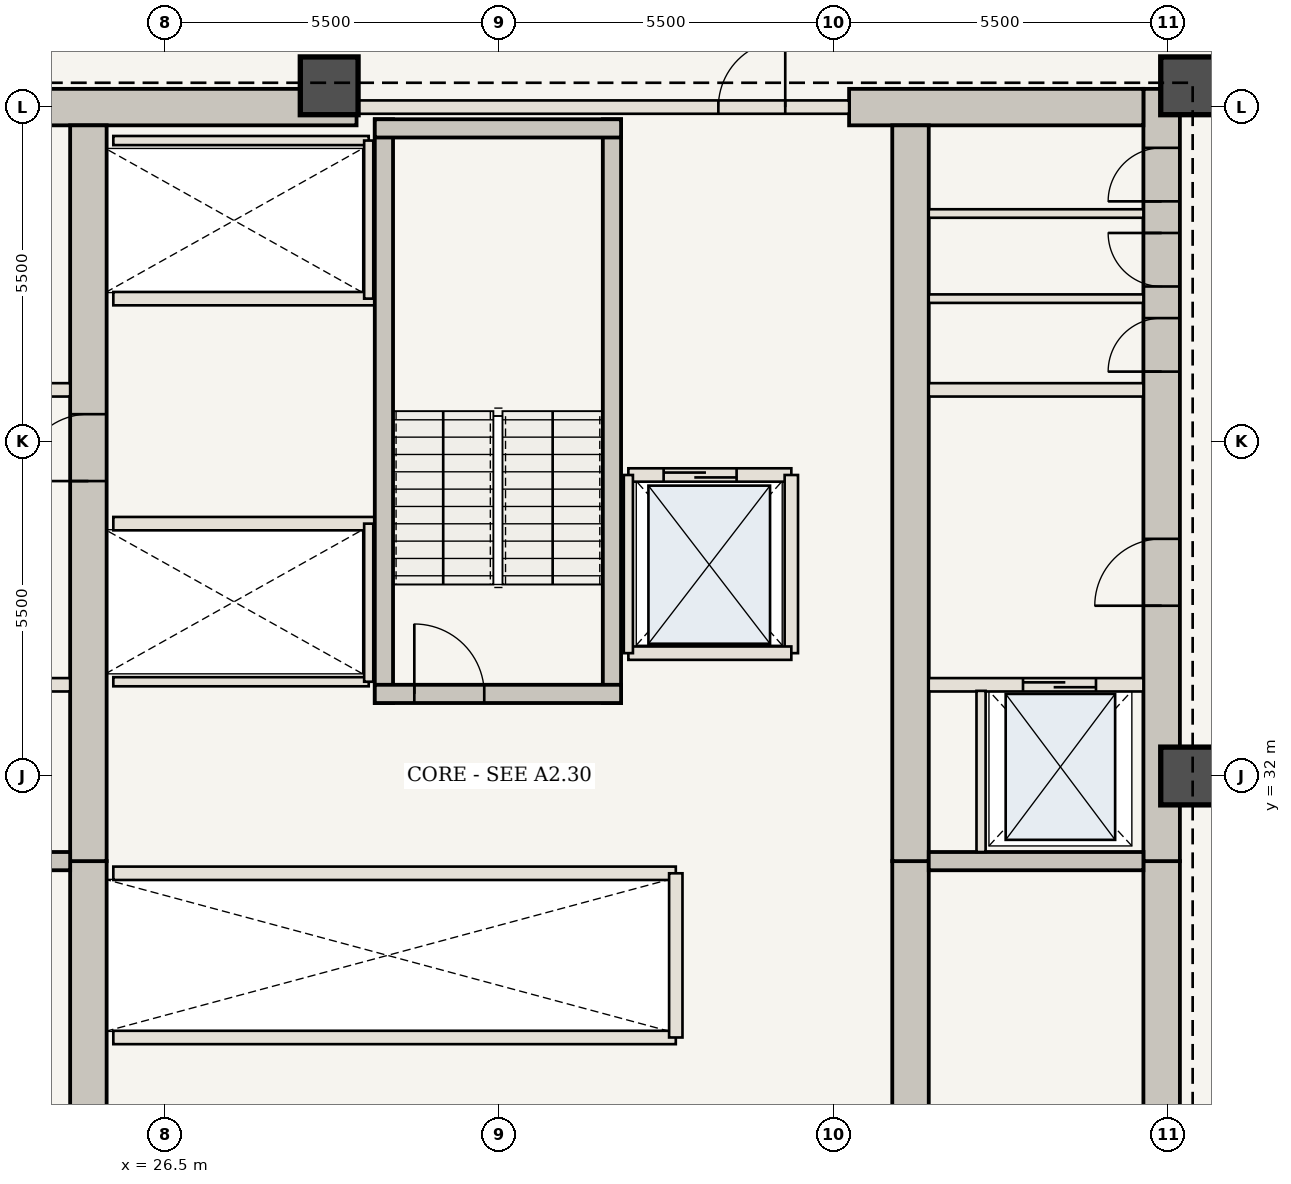
"""IFC4 building model, lengths in metres.
Left out: names, types, materials, properties, quantities, classifications, styles, units other than length and angle.
Written with IfcOpenShell. Run it as: python <this file> out.ifc"""

import sys

from ifc_helpers import new_model, si_unit, direction, frame, frame_2d, origin, origin_2d, place, context, subcontext, project, spatial, rectangle, extrude, element, fill, save


model = new_model("IFC4")
c1 = context("Model", 3, precision=1e-05, world=origin(), true_north=direction((0.0, 1.0)))
c2 = subcontext(c1, "Body", "Model", "MODEL_VIEW")
j1 = project(units=[si_unit("LENGTHUNIT", "METRE"), si_unit("PLANEANGLEUNIT", "RADIAN")], contexts=[c1])
p1 = place(None, origin())
s1 = spatial("IfcSite", under=j1, at=p1, CompositionType="ELEMENT")
p2 = place(p1, origin())
s2 = spatial("IfcBuilding", under=s1, at=p2, CompositionType="ELEMENT")
p3 = place(p2, frame((0.0, 0.0, 129.85)))
s3 = spatial("IfcBuildingStorey", under=s2, at=p3, CompositionType="ELEMENT", Elevation=129.85)
p4 = place(p3, frame((42.89, 20.65, 0.0), z_axis=(0.0, 0.0, 1.0), x_axis=(0.0, 1.0, 0.0)))
e1 = element("IfcWall", 1, at=p4, inside=s3, PredefinedType="SHEAR", context=c2, shape_type="SweptSolid", body=[
    extrude(rectangle(XDim=9.95, YDim=0.6, at=frame_2d((4.975, 0.0))), origin(), (0.0, 0.0, 1.0), 3.85),
])
p5 = place(p4, frame((1.1, 0.0, 0.0)))
e2 = element("IfcOpeningElement", 2, at=p5, cuts=e1, PredefinedType="OPENING", context=c2, shape_type="SweptSolid", body=[
    extrude(rectangle(XDim=1.15, YDim=2.15, at=frame_2d((0.575, 1.075))), frame((0.0, 0.31, 0.0), z_axis=(0.0, -1.0, 0.0), x_axis=(1.0, 0.0, 0.0)), (0.0, 0.0, 1.0), 0.62),
])
p6 = place(p3, frame((42.89, 30.6, 0.0), z_axis=(0.0, 0.0, 1.0), x_axis=(0.0, 1.0, 0.0)))
e3 = element("IfcWall", 3, at=p6, inside=s3, PredefinedType="SHEAR", context=c2, shape_type="SweptSolid", body=[
    extrude(rectangle(XDim=12.7, YDim=0.6, at=frame_2d((6.35, 0.0))), origin(), (0.0, 0.0, 1.0), 3.85),
])
p7 = place(p6, frame((4.2, 0.0, 0.0)))
e4 = element("IfcOpeningElement", 4, at=p7, cuts=e3, PredefinedType="OPENING", context=c2, shape_type="SweptSolid", body=[
    extrude(rectangle(XDim=1.1, YDim=2.15, at=frame_2d((0.55, 1.075))), frame((0.0, 0.31, 0.0), z_axis=(0.0, -1.0, 0.0), x_axis=(1.0, 0.0, 0.0)), (0.0, 0.0, 1.0), 0.62),
])
p8 = place(p6, frame((8.05, 0.0, 0.0)))
e5 = element("IfcOpeningElement", 5, at=p8, cuts=e3, PredefinedType="OPENING", context=c2, shape_type="SweptSolid", body=[
    extrude(rectangle(XDim=0.88, YDim=2.1, at=frame_2d((0.44, 1.05))), frame((0.0, 0.31, 0.0), z_axis=(0.0, -1.0, 0.0), x_axis=(1.0, 0.0, 0.0)), (0.0, 0.0, 1.0), 0.62),
])
p9 = place(p6, frame((9.45, 0.0, 0.0)))
e6 = element("IfcOpeningElement", 6, at=p9, cuts=e3, PredefinedType="OPENING", context=c2, shape_type="SweptSolid", body=[
    extrude(rectangle(XDim=0.88, YDim=2.1, at=frame_2d((0.44, 1.05))), frame((0.0, 0.31, 0.0), z_axis=(0.0, -1.0, 0.0), x_axis=(1.0, 0.0, 0.0)), (0.0, 0.0, 1.0), 0.62),
])
p10 = place(p6, frame((10.85, 0.0, 0.0)))
e7 = element("IfcOpeningElement", 7, at=p10, cuts=e3, PredefinedType="OPENING", context=c2, shape_type="SweptSolid", body=[
    extrude(rectangle(XDim=0.88, YDim=2.1, at=frame_2d((0.44, 1.05))), frame((0.0, 0.31, 0.0), z_axis=(0.0, -1.0, 0.0), x_axis=(1.0, 0.0, 0.0)), (0.0, 0.0, 1.0), 0.62),
])
p11 = place(p3, frame((21.41, 43.0, 0.0), z_axis=(0.0, 0.0, 1.0), x_axis=(1.0, 0.0, 0.0)))
e8 = element("IfcWall", 8, at=p11, inside=s3, PredefinedType="SHEAR", context=c2, shape_type="SweptSolid", body=[
    extrude(rectangle(XDim=8.24, YDim=0.6, at=frame_2d((4.12, 0.0))), origin(), (0.0, 0.0, 1.0), 3.85),
])
p12 = place(p3, frame((37.75, 43.0, 0.0), z_axis=(0.0, 0.0, 1.0), x_axis=(1.0, 0.0, 0.0)))
e9 = element("IfcWall", 9, at=p12, inside=s3, PredefinedType="SHEAR", context=c2, shape_type="SweptSolid", body=[
    extrude(rectangle(XDim=4.84, YDim=0.6, at=frame_2d((2.42, 0.0))), origin(), (0.0, 0.0, 1.0), 3.85),
])
p13 = place(p3, frame((25.24, 21.25, 0.0), z_axis=(0.0, 0.0, 1.0), x_axis=(0.0, 1.0, 0.0)))
e10 = element("IfcWall", 10, at=p13, inside=s3, PredefinedType="SHEAR", context=c2, shape_type="SweptSolid", body=[
    extrude(rectangle(XDim=9.35, YDim=0.6, at=frame_2d((4.675, 0.0))), origin(), (0.0, 0.0, 1.0), 3.85),
])
p14 = place(p3, frame((25.24, 30.6, 0.0), z_axis=(0.0, 0.0, 1.0), x_axis=(0.0, 1.0, 0.0)))
e11 = element("IfcWall", 11, at=p14, inside=s3, PredefinedType="SHEAR", context=c2, shape_type="SweptSolid", body=[
    extrude(rectangle(XDim=12.1, YDim=0.6, at=frame_2d((6.05, 0.0))), origin(), (0.0, 0.0, 1.0), 3.85),
])
p15 = place(p14, frame((6.25, 0.0, 0.0)))
e12 = element("IfcOpeningElement", 12, at=p15, cuts=e11, PredefinedType="OPENING", context=c2, shape_type="SweptSolid", body=[
    extrude(rectangle(XDim=1.1, YDim=2.15, at=frame_2d((0.55, 1.075))), frame((0.0, 0.31, 0.0), z_axis=(0.0, -1.0, 0.0), x_axis=(1.0, 0.0, 0.0)), (0.0, 0.0, 1.0), 0.62),
])
p16 = place(p3, frame((38.76, 21.25, 0.0), z_axis=(0.0, 0.0, 1.0), x_axis=(0.0, 1.0, 0.0)))
e13 = element("IfcWall", 13, at=p16, inside=s3, PredefinedType="SHEAR", context=c2, shape_type="SweptSolid", body=[
    extrude(rectangle(XDim=9.35, YDim=0.6, at=frame_2d((4.675, 0.0))), origin(), (0.0, 0.0, 1.0), 3.85),
])
p17 = place(p3, frame((38.76, 30.6, 0.0), z_axis=(0.0, 0.0, 1.0), x_axis=(0.0, 1.0, 0.0)))
e14 = element("IfcWall", 14, at=p17, inside=s3, PredefinedType="SHEAR", context=c2, shape_type="SweptSolid", body=[
    extrude(rectangle(XDim=12.1, YDim=0.6, at=frame_2d((6.05, 0.0))), origin(), (0.0, 0.0, 1.0), 3.85),
])
for number, where, z_axis, x_axis in (
    (15, (43.35, 32.0, 0.0), (0.0, 0.0, 1.0), (1.0, 0.0, 0.0)),
    (16, (43.35, 43.35, 0.0), (0.0, 0.0, 1.0), (1.0, 0.0, 0.0)),
    (17, (29.2, 43.35, 0.0), (0.0, 0.0, 1.0), (1.0, 0.0, 0.0)),
):
    element("IfcColumn", number, at=place(p3, frame(where, z_axis=z_axis, x_axis=x_axis)), inside=s3, PredefinedType="COLUMN", context=c2, shape_type="SweptSolid", body=[
        extrude(rectangle(XDim=0.95, YDim=0.95, at=origin_2d()), origin(), (0.0, 0.0, 1.0), 3.85),
    ])
for number, where, z_axis, x_axis in (
    (18, (21.41, 30.6, 0.0), (0.0, 0.0, 1.0), (1.0, 0.0, 0.0)),
    (19, (39.06, 30.6, 0.0), (0.0, 0.0, 1.0), (1.0, 0.0, 0.0)),
):
    element("IfcWall", number, at=place(p3, frame(where, z_axis=z_axis, x_axis=x_axis)), inside=s3, PredefinedType="SHEAR", context=c2, shape_type="SweptSolid", body=[
        extrude(rectangle(XDim=3.53, YDim=0.3, at=frame_2d((1.765, 0.0))), origin(), (0.0, 0.0, 1.0), 3.685),
    ])
p18 = place(p3, frame((21.41, 33.5, 0.0), z_axis=(0.0, 0.0, 1.0), x_axis=(1.0, 0.0, 0.0)))
e20 = element("IfcWall", 20, at=p18, inside=s3, PredefinedType="STANDARD", context=c2, shape_type="SweptSolid", body=[
    extrude(rectangle(XDim=3.53, YDim=0.22, at=frame_2d((1.765, 0.0))), origin(), (0.0, 0.0, 1.0), 3.685),
])
p19 = place(p18, frame((0.75, 0.0, 0.0)))
e21 = element("IfcOpeningElement", 21, at=p19, cuts=e20, PredefinedType="OPENING", context=c2, shape_type="SweptSolid", body=[
    extrude(rectangle(XDim=1.2, YDim=2.2, at=frame_2d((0.6, 1.1))), frame((0.0, 0.12, 0.0), z_axis=(0.0, -1.0, 0.0), x_axis=(1.0, 0.0, 0.0)), (0.0, 0.0, 1.0), 0.24),
])
p20 = place(p3, frame((39.06, 33.5, 0.0), z_axis=(0.0, 0.0, 1.0), x_axis=(1.0, 0.0, 0.0)))
e22 = element("IfcWall", 22, at=p20, inside=s3, PredefinedType="STANDARD", context=c2, shape_type="SweptSolid", body=[
    extrude(rectangle(XDim=3.53, YDim=0.22, at=frame_2d((1.765, 0.0))), origin(), (0.0, 0.0, 1.0), 3.685),
])
p21 = place(p20, frame((1.55, 0.0, 0.0)))
e23 = element("IfcOpeningElement", 23, at=p21, cuts=e22, PredefinedType="OPENING", context=c2, shape_type="SweptSolid", body=[
    extrude(rectangle(XDim=1.2, YDim=2.2, at=frame_2d((0.6, 1.1))), frame((0.0, 0.12, 0.0), z_axis=(0.0, -1.0, 0.0), x_axis=(1.0, 0.0, 0.0)), (0.0, 0.0, 1.0), 0.24),
])
p22 = place(p3, frame((39.92, 30.75, 0.0), z_axis=(0.0, 0.0, 1.0), x_axis=(0.0, 1.0, 0.0)))
e24 = element("IfcWall", 24, at=p22, inside=s3, PredefinedType="STANDARD", context=c2, shape_type="SweptSolid", body=[
    extrude(rectangle(XDim=2.65, YDim=0.15, at=frame_2d((1.325, 0.0))), origin(), (0.0, 0.0, 1.0), 3.685),
])
for number, where, z_axis, x_axis in (
    (25, (21.41, 38.35, 0.0), (0.0, 0.0, 1.0), (1.0, 0.0, 0.0)),
    (26, (39.06, 38.35, 0.0), (0.0, 0.0, 1.0), (1.0, 0.0, 0.0)),
):
    element("IfcWall", number, at=place(p3, frame(where, z_axis=z_axis, x_axis=x_axis)), inside=s3, PredefinedType="STANDARD", context=c2, shape_type="SweptSolid", body=[
        extrude(rectangle(XDim=3.53, YDim=0.22, at=frame_2d((1.765, 0.0))), origin(), (0.0, 0.0, 1.0), 3.685),
    ])
for number, where, z_axis, x_axis in (
    (27, (39.06, 39.85, 0.0), (0.0, 0.0, 1.0), (1.0, 0.0, 0.0)),
    (28, (39.06, 41.25, 0.0), (0.0, 0.0, 1.0), (1.0, 0.0, 0.0)),
):
    element("IfcWall", number, at=place(p3, frame(where, z_axis=z_axis, x_axis=x_axis)), inside=s3, PredefinedType="STANDARD", context=c2, shape_type="SweptSolid", body=[
        extrude(rectangle(XDim=3.53, YDim=0.14, at=frame_2d((1.765, 0.0))), origin(), (0.0, 0.0, 1.0), 3.685),
    ])
for number, where, z_axis, x_axis in (
    (29, (25.65, 27.7, 0.0), (0.0, 0.0, 1.0), (1.0, 0.0, 0.0)),
    (30, (25.65, 30.4, 0.0), (0.0, 0.0, 1.0), (1.0, 0.0, 0.0)),
):
    element("IfcWall", number, at=place(p3, frame(where, z_axis=z_axis, x_axis=x_axis)), inside=s3, PredefinedType="STANDARD", context=c2, shape_type="SweptSolid", body=[
        extrude(rectangle(XDim=9.25, YDim=0.22, at=frame_2d((4.625, 0.0))), origin(), (0.0, 0.0, 1.0), 3.685),
    ])
p23 = place(p3, frame((34.9, 27.7, 0.0), z_axis=(0.0, 0.0, 1.0), x_axis=(0.0, 1.0, 0.0)))
e31 = element("IfcWall", 31, at=p23, inside=s3, PredefinedType="STANDARD", context=c2, shape_type="SweptSolid", body=[
    extrude(rectangle(XDim=2.7, YDim=0.22, at=frame_2d((1.35, 0.0))), origin(), (0.0, 0.0, 1.0), 3.685),
])
p24 = place(p3, frame((25.65, 36.15, 0.0), z_axis=(0.0, 0.0, 1.0), x_axis=(1.0, 0.0, 0.0)))
e32 = element("IfcWall", 32, at=p24, inside=s3, PredefinedType="STANDARD", context=c2, shape_type="SweptSolid", body=[
    extrude(rectangle(XDim=4.3, YDim=0.22, at=frame_2d((2.15, 0.0))), origin(), (0.0, 0.0, 1.0), 3.685),
])
p25 = place(p3, frame((25.65, 33.55, 0.0), z_axis=(0.0, 0.0, 1.0), x_axis=(1.0, 0.0, 0.0)))
e33 = element("IfcWall", 33, at=p25, inside=s3, PredefinedType="STANDARD", context=c2, shape_type="SweptSolid", body=[
    extrude(rectangle(XDim=4.2, YDim=0.15, at=frame_2d((2.1, 0.0))), origin(), (0.0, 0.0, 1.0), 3.685),
])
p26 = place(p3, frame((29.85, 33.55, 0.0), z_axis=(0.0, 0.0, 1.0), x_axis=(0.0, 1.0, 0.0)))
e34 = element("IfcWall", 34, at=p26, inside=s3, PredefinedType="STANDARD", context=c2, shape_type="SweptSolid", body=[
    extrude(rectangle(XDim=2.6, YDim=0.15, at=frame_2d((1.3, 0.0))), origin(), (0.0, 0.0, 1.0), 3.685),
])
p27 = place(p3, frame((25.65, 39.85, 0.0), z_axis=(0.0, 0.0, 1.0), x_axis=(1.0, 0.0, 0.0)))
e35 = element("IfcWall", 35, at=p27, inside=s3, PredefinedType="STANDARD", context=c2, shape_type="SweptSolid", body=[
    extrude(rectangle(XDim=4.3, YDim=0.22, at=frame_2d((2.15, 0.0))), origin(), (0.0, 0.0, 1.0), 3.685),
])
p28 = place(p3, frame((25.65, 42.45, 0.0), z_axis=(0.0, 0.0, 1.0), x_axis=(1.0, 0.0, 0.0)))
e36 = element("IfcWall", 36, at=p28, inside=s3, PredefinedType="STANDARD", context=c2, shape_type="SweptSolid", body=[
    extrude(rectangle(XDim=4.2, YDim=0.15, at=frame_2d((2.1, 0.0))), origin(), (0.0, 0.0, 1.0), 3.685),
])
p29 = place(p3, frame((29.85, 39.85, 0.0), z_axis=(0.0, 0.0, 1.0), x_axis=(0.0, 1.0, 0.0)))
e37 = element("IfcWall", 37, at=p29, inside=s3, PredefinedType="STANDARD", context=c2, shape_type="SweptSolid", body=[
    extrude(rectangle(XDim=2.6, YDim=0.15, at=frame_2d((1.3, 0.0))), origin(), (0.0, 0.0, 1.0), 3.685),
])
for number, where, z_axis, x_axis in (
    (38, (30.1, 33.2, 0.0), (0.0, 0.0, 1.0), (0.0, 1.0, 0.0)),
    (39, (33.85, 33.2, 0.0), (0.0, 0.0, 1.0), (0.0, 1.0, 0.0)),
):
    element("IfcWall", number, at=place(p3, frame(where, z_axis=z_axis, x_axis=x_axis)), inside=s3, PredefinedType="SHEAR", context=c2, shape_type="SweptSolid", body=[
        extrude(rectangle(XDim=9.6, YDim=0.3, at=frame_2d((4.8, 0.0))), origin(), (0.0, 0.0, 1.0), 3.685),
    ])
p30 = place(p3, frame((29.95, 33.35, 0.0), z_axis=(0.0, 0.0, 1.0), x_axis=(1.0, 0.0, 0.0)))
e40 = element("IfcWall", 40, at=p30, inside=s3, PredefinedType="SHEAR", context=c2, shape_type="SweptSolid", body=[
    extrude(rectangle(XDim=4.05, YDim=0.3, at=frame_2d((2.025, 0.0))), origin(), (0.0, 0.0, 1.0), 3.685),
])
p31 = place(p30, frame((0.65, 0.0, 0.0)))
e41 = element("IfcOpeningElement", 41, at=p31, cuts=e40, PredefinedType="OPENING", context=c2, shape_type="SweptSolid", body=[
    extrude(rectangle(XDim=1.15, YDim=2.15, at=frame_2d((0.575, 1.075))), frame((0.0, 0.16, 0.0), z_axis=(0.0, -1.0, 0.0), x_axis=(1.0, 0.0, 0.0)), (0.0, 0.0, 1.0), 0.32),
])
p32 = place(p3, frame((29.95, 42.65, 0.0), z_axis=(0.0, 0.0, 1.0), x_axis=(1.0, 0.0, 0.0)))
e42 = element("IfcWall", 42, at=p32, inside=s3, PredefinedType="SHEAR", context=c2, shape_type="SweptSolid", body=[
    extrude(rectangle(XDim=4.05, YDim=0.3, at=frame_2d((2.025, 0.0))), origin(), (0.0, 0.0, 1.0), 3.685),
])
p33 = place(p3, frame((29.65, 43.0, 0.0), z_axis=(0.0, 0.0, 1.0), x_axis=(1.0, 0.0, 0.0)))
e43 = element("IfcWall", 43, at=p33, inside=s3, PredefinedType="STANDARD", context=c2, shape_type="SweptSolid", body=[
    extrude(rectangle(XDim=8.1, YDim=0.22, at=frame_2d((4.05, 0.0))), origin(), (0.0, 0.0, 1.0), 3.685),
])
p34 = place(p33, frame((5.95, 0.0, 0.0)))
e44 = element("IfcOpeningElement", 44, at=p34, cuts=e43, PredefinedType="OPENING", context=c2, shape_type="SweptSolid", body=[
    extrude(rectangle(XDim=1.1, YDim=2.15, at=frame_2d((0.55, 1.075))), frame((0.0, 0.12, 0.0), z_axis=(0.0, -1.0, 0.0), x_axis=(1.0, 0.0, 0.0)), (0.0, 0.0, 1.0), 0.24),
])
p35 = place(p3, frame((34.12, 36.95, 0.0), z_axis=(0.0, 0.0, 1.0), x_axis=(1.0, 0.0, 0.0)))
e45 = element("IfcWall", 45, at=p35, inside=s3, PredefinedType="STANDARD", context=c2, shape_type="SweptSolid", body=[
    extrude(rectangle(XDim=2.68, YDim=0.22, at=frame_2d((1.34, 0.0))), origin(), (0.0, 0.0, 1.0), 3.685),
])
p36 = place(p35, frame((0.58, 0.0, 0.0)))
e46 = element("IfcOpeningElement", 46, at=p36, cuts=e45, PredefinedType="OPENING", context=c2, shape_type="SweptSolid", body=[
    extrude(rectangle(XDim=1.2, YDim=2.2, at=frame_2d((0.6, 1.1))), frame((0.0, 0.12, 0.0), z_axis=(0.0, -1.0, 0.0), x_axis=(1.0, 0.0, 0.0)), (0.0, 0.0, 1.0), 0.24),
])
p37 = place(p3, frame((36.8, 34.02, 0.0), z_axis=(0.0, 0.0, 1.0), x_axis=(0.0, 1.0, 0.0)))
e47 = element("IfcWall", 47, at=p37, inside=s3, PredefinedType="STANDARD", context=c2, shape_type="SweptSolid", body=[
    extrude(rectangle(XDim=2.93, YDim=0.22, at=frame_2d((1.465, 0.0))), origin(), (0.0, 0.0, 1.0), 3.685),
])
p38 = place(p3, frame((34.12, 34.02, 0.0), z_axis=(0.0, 0.0, 1.0), x_axis=(1.0, 0.0, 0.0)))
e48 = element("IfcWall", 48, at=p38, inside=s3, PredefinedType="STANDARD", context=c2, shape_type="SweptSolid", body=[
    extrude(rectangle(XDim=2.68, YDim=0.22, at=frame_2d((1.34, 0.0))), origin(), (0.0, 0.0, 1.0), 3.685),
])
p39 = place(p3, frame((34.12, 34.02, 0.0), z_axis=(0.0, 0.0, 1.0), x_axis=(0.0, 1.0, 0.0)))
e49 = element("IfcWall", 49, at=p39, inside=s3, PredefinedType="STANDARD", context=c2, shape_type="SweptSolid", body=[
    extrude(rectangle(XDim=2.93, YDim=0.15, at=frame_2d((1.465, 0.0))), origin(), (0.0, 0.0, 1.0), 3.685),
])
p40 = place(p7, origin())
e50 = element("IfcDoor", 50, at=p40, inside=s3, OperationType="SINGLE_SWING_LEFT", PredefinedType="DOOR", context=c2, shape_type="SweptSolid", body=[
    extrude(rectangle(XDim=1.1, YDim=2.15, at=frame_2d((0.55, 1.075))), frame((0.0, 0.025, 0.0), z_axis=(0.0, -1.0, 0.0), x_axis=(1.0, 0.0, 0.0)), (0.0, 0.0, 1.0), 0.05),
])
fill(e4, e50)
p41 = place(p15, origin())
e51 = element("IfcDoor", 51, at=p41, inside=s3, OperationType="SINGLE_SWING_LEFT", PredefinedType="DOOR", context=c2, shape_type="SweptSolid", body=[
    extrude(rectangle(XDim=1.1, YDim=2.15, at=frame_2d((0.55, 1.075))), frame((0.0, 0.025, 0.0), z_axis=(0.0, -1.0, 0.0), x_axis=(1.0, 0.0, 0.0)), (0.0, 0.0, 1.0), 0.05),
])
fill(e12, e51)
p42 = place(p8, origin())
e52 = element("IfcDoor", 52, at=p42, inside=s3, OperationType="SINGLE_SWING_LEFT", PredefinedType="DOOR", context=c2, shape_type="SweptSolid", body=[
    extrude(rectangle(XDim=0.88, YDim=2.1, at=frame_2d((0.44, 1.05))), frame((0.0, 0.025, 0.0), z_axis=(0.0, -1.0, 0.0), x_axis=(1.0, 0.0, 0.0)), (0.0, 0.0, 1.0), 0.05),
])
fill(e5, e52)
p43 = place(p9, origin())
e53 = element("IfcDoor", 53, at=p43, inside=s3, OperationType="SINGLE_SWING_RIGHT", PredefinedType="DOOR", context=c2, shape_type="SweptSolid", body=[
    extrude(rectangle(XDim=0.88, YDim=2.1, at=frame_2d((0.44, 1.05))), frame((0.0, 0.025, 0.0), z_axis=(0.0, -1.0, 0.0), x_axis=(1.0, 0.0, 0.0)), (0.0, 0.0, 1.0), 0.05),
])
fill(e6, e53)
p44 = place(p10, origin())
e54 = element("IfcDoor", 54, at=p44, inside=s3, OperationType="SINGLE_SWING_LEFT", PredefinedType="DOOR", context=c2, shape_type="SweptSolid", body=[
    extrude(rectangle(XDim=0.88, YDim=2.1, at=frame_2d((0.44, 1.05))), frame((0.0, 0.025, 0.0), z_axis=(0.0, -1.0, 0.0), x_axis=(1.0, 0.0, 0.0)), (0.0, 0.0, 1.0), 0.05),
])
fill(e7, e54)
p45 = place(p21, origin())
e55 = element("IfcDoor", 55, at=p45, inside=s3, OperationType="DOUBLE_DOOR_SLIDING", PredefinedType="DOOR", context=c2, shape_type="SweptSolid", body=[
    extrude(rectangle(XDim=1.2, YDim=2.2, at=frame_2d((0.6, 1.1))), frame((0.0, 0.025, 0.0), z_axis=(0.0, -1.0, 0.0), x_axis=(1.0, 0.0, 0.0)), (0.0, 0.0, 1.0), 0.05),
])
fill(e23, e55)
p46 = place(p31, origin())
e56 = element("IfcDoor", 56, at=p46, inside=s3, OperationType="SINGLE_SWING_LEFT", PredefinedType="DOOR", context=c2, shape_type="SweptSolid", body=[
    extrude(rectangle(XDim=1.15, YDim=2.15, at=frame_2d((0.575, 1.075))), frame((0.0, 0.025, 0.0), z_axis=(0.0, -1.0, 0.0), x_axis=(1.0, 0.0, 0.0)), (0.0, 0.0, 1.0), 0.05),
])
fill(e41, e56)
p47 = place(p34, origin())
e57 = element("IfcDoor", 57, at=p47, inside=s3, OperationType="SINGLE_SWING_RIGHT", PredefinedType="DOOR", context=c2, shape_type="SweptSolid", body=[
    extrude(rectangle(XDim=1.1, YDim=2.15, at=frame_2d((0.55, 1.075))), frame((0.0, 0.025, 0.0), z_axis=(0.0, -1.0, 0.0), x_axis=(1.0, 0.0, 0.0)), (0.0, 0.0, 1.0), 0.05),
])
fill(e44, e57)
p48 = place(p36, origin())
e58 = element("IfcDoor", 58, at=p48, inside=s3, OperationType="DOUBLE_DOOR_SLIDING", PredefinedType="DOOR", context=c2, shape_type="SweptSolid", body=[
    extrude(rectangle(XDim=1.2, YDim=2.2, at=frame_2d((0.6, 1.1))), frame((0.0, 0.025, 0.0), z_axis=(0.0, -1.0, 0.0), x_axis=(1.0, 0.0, 0.0)), (0.0, 0.0, 1.0), 0.05),
])
fill(e46, e58)
save(model, sys.argv[1])
